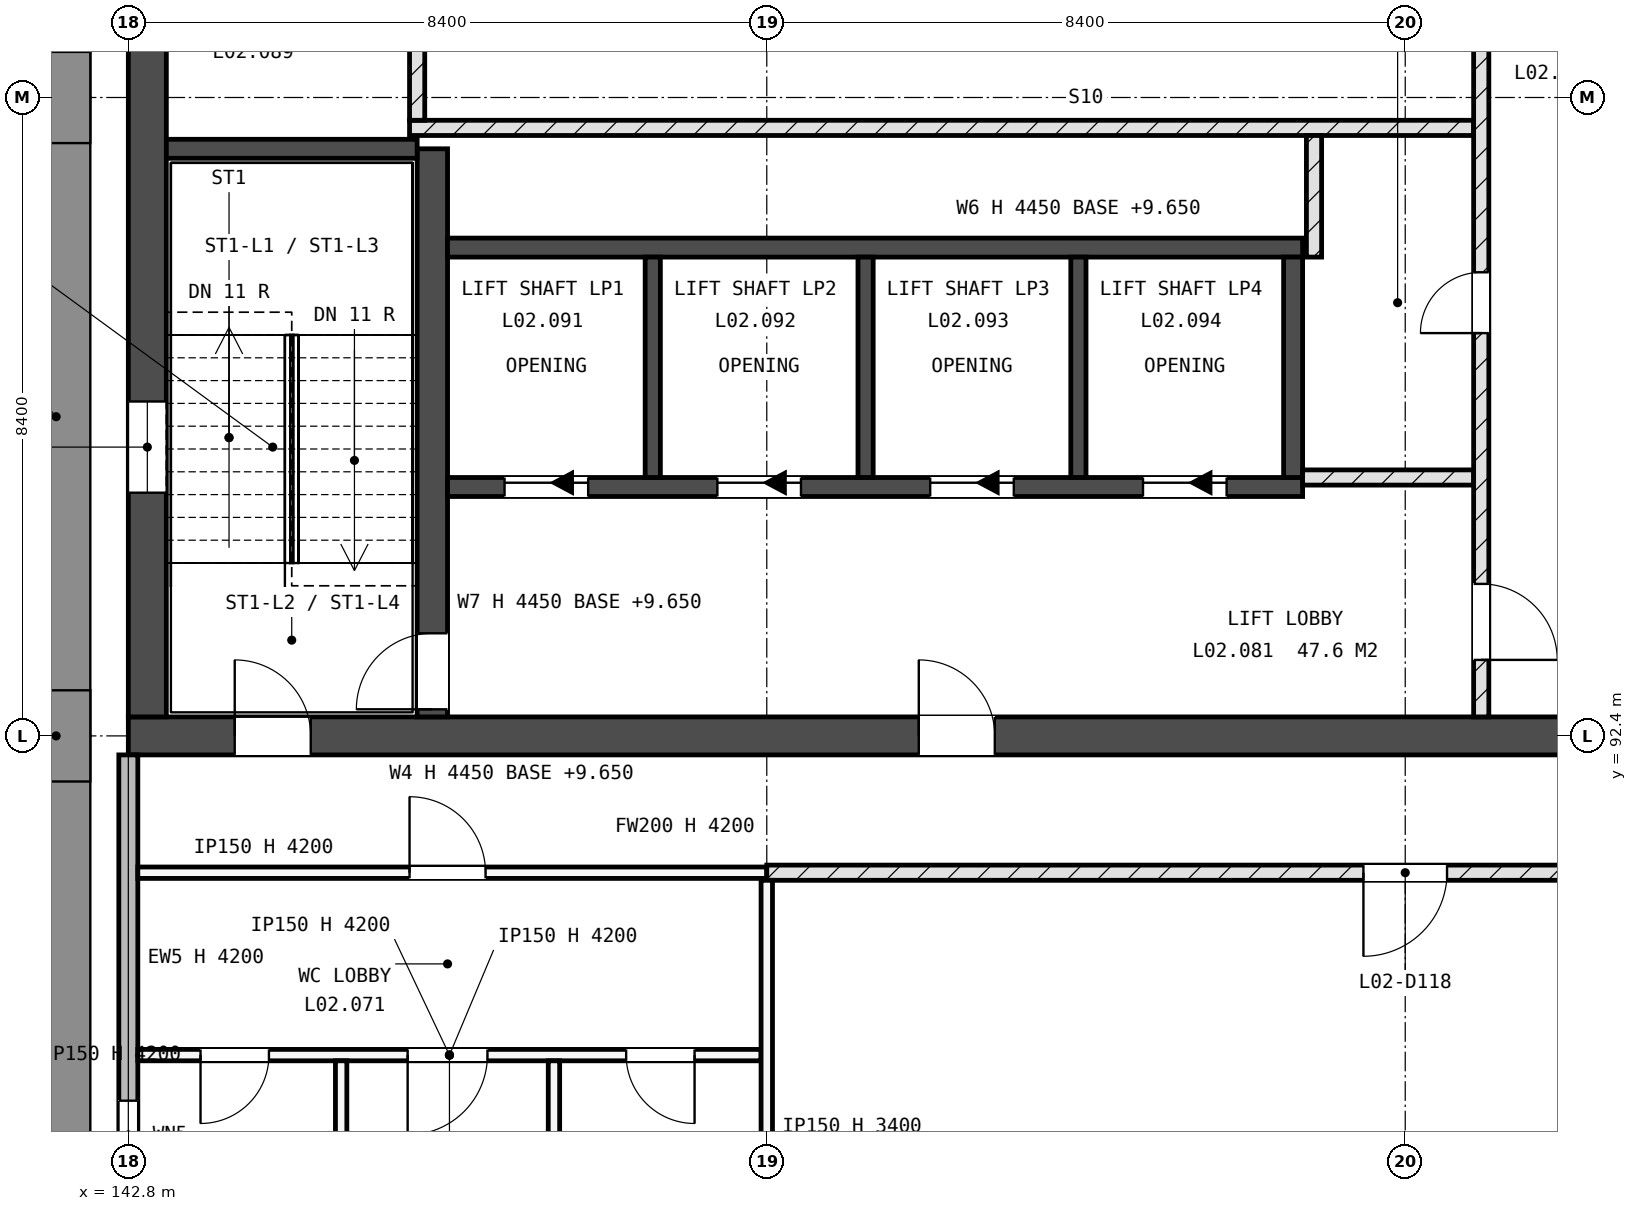
"""IFC4 building model, lengths in metres.
Left out: names, types, materials, properties, quantities, classifications, styles, units other than length and angle.
Written with IfcOpenShell. Run it as: python <this file> out.ifc"""

import sys

from ifc_helpers import new_model, si_unit, direction, frame, frame_2d, origin, place, context, subcontext, project, spatial, rectangle, extrude, element, fill, save


model = new_model("IFC4")
c1 = context("Model", 3, precision=1e-05, world=origin(), true_north=direction((0.0, 1.0)))
c2 = subcontext(c1, "Body", "Model", "MODEL_VIEW")
j1 = project(units=[si_unit("LENGTHUNIT", "METRE"), si_unit("PLANEANGLEUNIT", "RADIAN")], contexts=[c1])
p1 = place(None, origin())
s1 = spatial("IfcSite", under=j1, at=p1, CompositionType="ELEMENT")
p2 = place(p1, origin())
s2 = spatial("IfcBuilding", under=s1, at=p2, CompositionType="ELEMENT")
p3 = place(p2, frame((0.0, 0.0, 9.9)))
s3 = spatial("IfcBuildingStorey", under=s2, at=p3, CompositionType="ELEMENT", Elevation=9.9)
p4 = place(p3, frame((142.8, 92.4, -0.25), z_axis=(0.0, 0.0, 1.0), x_axis=(1.0, 0.0, 0.0)))
e1 = element("IfcWall", 1, at=p4, inside=s3, PredefinedType="SHEAR", context=c2, shape_type="SweptSolid", body=[
    extrude(rectangle(XDim=25.2, YDim=0.5, at=frame_2d((12.6, 0.0))), origin(), (0.0, 0.0, 1.0), 4.45),
])
p5 = place(p4, frame((1.4, 0.0, 0.25)))
e2 = element("IfcOpeningElement", 2, at=p5, cuts=e1, PredefinedType="OPENING", context=c2, shape_type="SweptSolid", body=[
    extrude(rectangle(XDim=1.0, YDim=2.1, at=frame_2d((0.5, 1.05))), frame((0.0, 0.26, 0.0), z_axis=(0.0, -1.0, 0.0), x_axis=(1.0, 0.0, 0.0)), (0.0, 0.0, 1.0), 0.52),
])
p6 = place(p4, frame((19.1, 0.0, 0.25)))
e3 = element("IfcOpeningElement", 3, at=p6, cuts=e1, PredefinedType="OPENING", context=c2, shape_type="SweptSolid", body=[
    extrude(rectangle(XDim=1.0, YDim=2.1, at=frame_2d((0.5, 1.05))), frame((0.0, 0.26, 0.0), z_axis=(0.0, -1.0, 0.0), x_axis=(1.0, 0.0, 0.0)), (0.0, 0.0, 1.0), 0.52),
])
p7 = place(p4, frame((10.4, 0.0, 0.25)))
e4 = element("IfcOpeningElement", 4, at=p7, cuts=e1, PredefinedType="OPENING", context=c2, shape_type="SweptSolid", body=[
    extrude(rectangle(XDim=1.0, YDim=2.1, at=frame_2d((0.5, 1.05))), frame((0.0, 0.26, 0.0), z_axis=(0.0, -1.0, 0.0), x_axis=(1.0, 0.0, 0.0)), (0.0, 0.0, 1.0), 0.52),
])
p8 = place(p3, frame((143.05, 92.65, -0.25), z_axis=(0.0, 0.0, 1.0), x_axis=(0.0, 1.0, 0.0)))
e5 = element("IfcWall", 5, at=p8, inside=s3, PredefinedType="SHEAR", context=c2, shape_type="SweptSolid", body=[
    extrude(rectangle(XDim=16.3, YDim=0.5, at=frame_2d((8.15, 0.0))), origin(), (0.0, 0.0, 1.0), 4.45),
])
p9 = place(p8, frame((2.95, 0.0, 1.85)))
e6 = element("IfcOpeningElement", 6, at=p9, cuts=e5, PredefinedType="OPENING", context=c2, shape_type="SweptSolid", body=[
    extrude(rectangle(XDim=1.2, YDim=0.9, at=frame_2d((0.6, 0.45))), frame((0.0, 0.26, 0.0), z_axis=(0.0, -1.0, 0.0), x_axis=(1.0, 0.0, 0.0)), (0.0, 0.0, 1.0), 0.52),
])
p10 = place(p3, frame((146.8, 92.65, -0.25), z_axis=(0.0, 0.0, 1.0), x_axis=(0.0, 1.0, 0.0)))
e7 = element("IfcWall", 7, at=p10, inside=s3, PredefinedType="SHEAR", context=c2, shape_type="SweptSolid", body=[
    extrude(rectangle(XDim=7.475, YDim=0.4, at=frame_2d((3.738, 0.0))), origin(), (0.0, 0.0, 1.0), 4.45),
])
p11 = place(p10, frame((0.1, 0.0, 0.25)))
e8 = element("IfcOpeningElement", 8, at=p11, cuts=e7, PredefinedType="OPENING", context=c2, shape_type="SweptSolid", body=[
    extrude(rectangle(XDim=1.0, YDim=2.1, at=frame_2d((0.5, 1.05))), frame((0.0, 0.21, 0.0), z_axis=(0.0, -1.0, 0.0), x_axis=(1.0, 0.0, 0.0)), (0.0, 0.0, 1.0), 0.42),
])
p12 = place(p3, frame((143.3, 100.125, -0.25), z_axis=(0.0, 0.0, 1.0), x_axis=(1.0, 0.0, 0.0)))
e9 = element("IfcWall", 9, at=p12, inside=s3, PredefinedType="SHEAR", context=c2, shape_type="SweptSolid", body=[
    extrude(rectangle(XDim=3.3, YDim=0.25, at=frame_2d((1.65, 0.0))), origin(), (0.0, 0.0, 1.0), 4.45),
])
p13 = place(p3, frame((147.0, 95.675, -0.25), z_axis=(0.0, 0.0, 1.0), x_axis=(1.0, 0.0, 0.0)))
e10 = element("IfcWall", 10, at=p13, inside=s3, PredefinedType="SHEAR", context=c2, shape_type="SweptSolid", body=[
    extrude(rectangle(XDim=11.25, YDim=0.25, at=frame_2d((5.625, 0.0))), origin(), (0.0, 0.0, 1.0), 4.45),
])
p14 = place(p13, frame((0.75, 0.0, 0.25)))
e11 = element("IfcOpeningElement", 11, at=p14, cuts=e10, PredefinedType="OPENING", context=c2, shape_type="SweptSolid", body=[
    extrude(rectangle(XDim=1.1, YDim=2.1, at=frame_2d((0.55, 1.05))), frame((0.0, 0.135, 0.0), z_axis=(0.0, -1.0, 0.0), x_axis=(1.0, 0.0, 0.0)), (0.0, 0.0, 1.0), 0.27),
])
p15 = place(p13, frame((3.55, 0.0, 0.25)))
e12 = element("IfcOpeningElement", 12, at=p15, cuts=e10, PredefinedType="OPENING", context=c2, shape_type="SweptSolid", body=[
    extrude(rectangle(XDim=1.1, YDim=2.1, at=frame_2d((0.55, 1.05))), frame((0.0, 0.135, 0.0), z_axis=(0.0, -1.0, 0.0), x_axis=(1.0, 0.0, 0.0)), (0.0, 0.0, 1.0), 0.27),
])
p16 = place(p13, frame((6.35, 0.0, 0.25)))
e13 = element("IfcOpeningElement", 13, at=p16, cuts=e10, PredefinedType="OPENING", context=c2, shape_type="SweptSolid", body=[
    extrude(rectangle(XDim=1.1, YDim=2.1, at=frame_2d((0.55, 1.05))), frame((0.0, 0.135, 0.0), z_axis=(0.0, -1.0, 0.0), x_axis=(1.0, 0.0, 0.0)), (0.0, 0.0, 1.0), 0.27),
])
p17 = place(p13, frame((9.15, 0.0, 0.25)))
e14 = element("IfcOpeningElement", 14, at=p17, cuts=e10, PredefinedType="OPENING", context=c2, shape_type="SweptSolid", body=[
    extrude(rectangle(XDim=1.1, YDim=2.1, at=frame_2d((0.55, 1.05))), frame((0.0, 0.135, 0.0), z_axis=(0.0, -1.0, 0.0), x_axis=(1.0, 0.0, 0.0)), (0.0, 0.0, 1.0), 0.27),
])
p18 = place(p3, frame((147.0, 98.825, -0.25), z_axis=(0.0, 0.0, 1.0), x_axis=(1.0, 0.0, 0.0)))
e15 = element("IfcWall", 15, at=p18, inside=s3, PredefinedType="SHEAR", context=c2, shape_type="SweptSolid", body=[
    extrude(rectangle(XDim=11.25, YDim=0.25, at=frame_2d((5.625, 0.0))), origin(), (0.0, 0.0, 1.0), 4.45),
])
p19 = place(p3, frame((158.125, 95.8, -0.25), z_axis=(0.0, 0.0, 1.0), x_axis=(0.0, 1.0, 0.0)))
e16 = element("IfcWall", 16, at=p19, inside=s3, PredefinedType="SHEAR", context=c2, shape_type="SweptSolid", body=[
    extrude(rectangle(XDim=2.9, YDim=0.25, at=frame_2d((1.45, 0.0))), origin(), (0.0, 0.0, 1.0), 4.45),
])
for number, where, z_axis, x_axis in (
    (17, (149.7, 95.8, -0.25), (0.0, 0.0, 1.0), (0.0, 1.0, 0.0)),
    (18, (152.5, 95.8, -0.25), (0.0, 0.0, 1.0), (0.0, 1.0, 0.0)),
    (19, (155.3, 95.8, -0.25), (0.0, 0.0, 1.0), (0.0, 1.0, 0.0)),
):
    element("IfcWall", number, at=place(p3, frame(where, z_axis=z_axis, x_axis=x_axis)), inside=s3, PredefinedType="SHEAR", context=c2, shape_type="SweptSolid", body=[
        extrude(rectangle(XDim=2.9, YDim=0.2, at=frame_2d((1.45, 0.0))), origin(), (0.0, 0.0, 1.0), 4.45),
    ])
p20 = place(p3, frame((142.8, 84.5, 0.0), z_axis=(0.0, 0.0, 1.0), x_axis=(0.0, 1.0, 0.0)))
e20 = element("IfcWall", 20, at=p20, inside=s3, PredefinedType="STANDARD", context=c2, shape_type="SweptSolid", body=[
    extrude(rectangle(XDim=7.65, YDim=0.25, at=frame_2d((3.825, 0.0))), origin(), (0.0, 0.0, 1.0), 4.2),
])
p21 = place(p20, frame((2.2, 0.0, 2.1)))
e21 = element("IfcOpeningElement", 21, at=p21, cuts=e20, PredefinedType="OPENING", context=c2, shape_type="SweptSolid", body=[
    extrude(rectangle(XDim=0.9, YDim=0.6, at=frame_2d((0.45, 0.3))), frame((0.0, 0.135, 0.0), z_axis=(0.0, -1.0, 0.0), x_axis=(1.0, 0.0, 0.0)), (0.0, 0.0, 1.0), 0.27),
])
p22 = place(p3, frame((142.925, 88.2, 0.0), z_axis=(0.0, 0.0, 1.0), x_axis=(1.0, 0.0, 0.0)))
e22 = element("IfcWall", 22, at=p22, inside=s3, PredefinedType="PARTITIONING", context=c2, shape_type="SweptSolid", body=[
    extrude(rectangle(XDim=8.2, YDim=0.15, at=frame_2d((4.1, 0.0))), origin(), (0.0, 0.0, 1.0), 4.2),
])
p23 = place(p22, frame((0.825, 0.0, 0.0)))
e23 = element("IfcOpeningElement", 23, at=p23, cuts=e22, PredefinedType="OPENING", context=c2, shape_type="SweptSolid", body=[
    extrude(rectangle(XDim=0.9, YDim=2.1, at=frame_2d((0.45, 1.05))), frame((0.0, 0.085, 0.0), z_axis=(0.0, -1.0, 0.0), x_axis=(1.0, 0.0, 0.0)), (0.0, 0.0, 1.0), 0.17),
])
p24 = place(p22, frame((3.55, 0.0, 0.0)))
e24 = element("IfcOpeningElement", 24, at=p24, cuts=e22, PredefinedType="OPENING", context=c2, shape_type="SweptSolid", body=[
    extrude(rectangle(XDim=1.05, YDim=2.25, at=frame_2d((0.525, 1.125))), frame((0.0, 0.085, 0.0), z_axis=(0.0, -1.0, 0.0), x_axis=(1.0, 0.0, 0.0)), (0.0, 0.0, 1.0), 0.17),
])
p25 = place(p22, frame((6.425, 0.0, 0.0)))
e25 = element("IfcOpeningElement", 25, at=p25, cuts=e22, PredefinedType="OPENING", context=c2, shape_type="SweptSolid", body=[
    extrude(rectangle(XDim=0.9, YDim=2.1, at=frame_2d((0.45, 1.05))), frame((0.0, 0.085, 0.0), z_axis=(0.0, -1.0, 0.0), x_axis=(1.0, 0.0, 0.0)), (0.0, 0.0, 1.0), 0.17),
])
p26 = place(p3, frame((142.925, 90.6, 0.0), z_axis=(0.0, 0.0, 1.0), x_axis=(1.0, 0.0, 0.0)))
e26 = element("IfcWall", 26, at=p26, inside=s3, PredefinedType="PARTITIONING", context=c2, shape_type="SweptSolid", body=[
    extrude(rectangle(XDim=8.275, YDim=0.15, at=frame_2d((4.137, 0.0))), origin(), (0.0, 0.0, 1.0), 4.2),
])
p27 = place(p26, frame((3.575, 0.0, 0.0)))
e27 = element("IfcOpeningElement", 27, at=p27, cuts=e26, PredefinedType="OPENING", context=c2, shape_type="SweptSolid", body=[
    extrude(rectangle(XDim=1.0, YDim=2.1, at=frame_2d((0.5, 1.05))), frame((0.0, 0.085, 0.0), z_axis=(0.0, -1.0, 0.0), x_axis=(1.0, 0.0, 0.0)), (0.0, 0.0, 1.0), 0.17),
])
p28 = place(p3, frame((151.2, 90.6, 0.0), z_axis=(0.0, 0.0, 1.0), x_axis=(1.0, 0.0, 0.0)))
e28 = element("IfcWall", 28, at=p28, inside=s3, PredefinedType="SOLIDWALL", context=c2, shape_type="SweptSolid", body=[
    extrude(rectangle(XDim=16.8, YDim=0.2, at=frame_2d((8.4, 0.0))), origin(), (0.0, 0.0, 1.0), 4.2),
])
p29 = place(p28, frame((7.85, 0.0, 0.0)))
e29 = element("IfcOpeningElement", 29, at=p29, cuts=e28, PredefinedType="OPENING", context=c2, shape_type="SweptSolid", body=[
    extrude(rectangle(XDim=1.1, YDim=2.25, at=frame_2d((0.55, 1.125))), frame((0.0, 0.11, 0.0), z_axis=(0.0, -1.0, 0.0), x_axis=(1.0, 0.0, 0.0)), (0.0, 0.0, 1.0), 0.22),
])
p30 = place(p3, frame((158.25, 95.8, 0.0), z_axis=(0.0, 0.0, 1.0), x_axis=(1.0, 0.0, 0.0)))
e30 = element("IfcWall", 30, at=p30, inside=s3, PredefinedType="SOLIDWALL", context=c2, shape_type="SweptSolid", body=[
    extrude(rectangle(XDim=2.25, YDim=0.2, at=frame_2d((1.125, 0.0))), origin(), (0.0, 0.0, 1.0), 4.2),
])
p31 = place(p3, frame((146.5, 100.4, 0.0), z_axis=(0.0, 0.0, 1.0), x_axis=(1.0, 0.0, 0.0)))
e31 = element("IfcWall", 31, at=p31, inside=s3, PredefinedType="SOLIDWALL", context=c2, shape_type="SweptSolid", body=[
    extrude(rectangle(XDim=14.0, YDim=0.2, at=frame_2d((7.0, 0.0))), origin(), (0.0, 0.0, 1.0), 4.2),
])
p32 = place(p3, frame((145.6, 84.125, 0.0), z_axis=(0.0, 0.0, 1.0), x_axis=(0.0, 1.0, 0.0)))
e32 = element("IfcWall", 32, at=p32, inside=s3, PredefinedType="PARTITIONING", context=c2, shape_type="SweptSolid", body=[
    extrude(rectangle(XDim=4.0, YDim=0.15, at=frame_2d((2.0, 0.0))), origin(), (0.0, 0.0, 1.0), 4.2),
])
p33 = place(p3, frame((146.6, 100.5, 0.0), z_axis=(0.0, 0.0, 1.0), x_axis=(0.0, 1.0, 0.0)))
e33 = element("IfcWall", 33, at=p33, inside=s3, PredefinedType="SOLIDWALL", context=c2, shape_type="SweptSolid", body=[
    extrude(rectangle(XDim=5.3, YDim=0.2, at=frame_2d((2.65, 0.0))), origin(), (0.0, 0.0, 1.0), 4.2),
])
p34 = place(p33, frame((1.8, 0.0, 0.0)))
e34 = element("IfcOpeningElement", 34, at=p34, cuts=e33, PredefinedType="OPENING", context=c2, shape_type="SweptSolid", body=[
    extrude(rectangle(XDim=1.0, YDim=2.1, at=frame_2d((0.5, 1.05))), frame((0.0, 0.11, 0.0), z_axis=(0.0, -1.0, 0.0), x_axis=(1.0, 0.0, 0.0)), (0.0, 0.0, 1.0), 0.22),
])
p35 = place(p3, frame((148.4, 84.125, 0.0), z_axis=(0.0, 0.0, 1.0), x_axis=(0.0, 1.0, 0.0)))
e35 = element("IfcWall", 35, at=p35, inside=s3, PredefinedType="PARTITIONING", context=c2, shape_type="SweptSolid", body=[
    extrude(rectangle(XDim=4.0, YDim=0.15, at=frame_2d((2.0, 0.0))), origin(), (0.0, 0.0, 1.0), 4.2),
])
p36 = place(p3, frame((151.2, 84.0, 0.0), z_axis=(0.0, 0.0, 1.0), x_axis=(0.0, 1.0, 0.0)))
e36 = element("IfcWall", 36, at=p36, inside=s3, PredefinedType="PARTITIONING", context=c2, shape_type="SweptSolid", body=[
    extrude(rectangle(XDim=6.5, YDim=0.15, at=frame_2d((3.25, 0.0))), origin(), (0.0, 0.0, 1.0), 3.4),
])
p37 = place(p3, frame((158.4, 98.7, 0.0), z_axis=(0.0, 0.0, 1.0), x_axis=(0.0, 1.0, 0.0)))
e37 = element("IfcWall", 37, at=p37, inside=s3, PredefinedType="SOLIDWALL", context=c2, shape_type="SweptSolid", body=[
    extrude(rectangle(XDim=1.6, YDim=0.2, at=frame_2d((0.8, 0.0))), origin(), (0.0, 0.0, 1.0), 4.2),
])
p38 = place(p3, frame((160.6, 92.65, 0.0), z_axis=(0.0, 0.0, 1.0), x_axis=(0.0, 1.0, 0.0)))
e38 = element("IfcWall", 38, at=p38, inside=s3, PredefinedType="SOLIDWALL", context=c2, shape_type="SweptSolid", body=[
    extrude(rectangle(XDim=12.45, YDim=0.2, at=frame_2d((6.225, 0.0))), origin(), (0.0, 0.0, 1.0), 4.2),
])
p39 = place(p38, frame((5.05, 0.0, 0.0)))
e39 = element("IfcOpeningElement", 39, at=p39, cuts=e38, PredefinedType="OPENING", context=c2, shape_type="SweptSolid", body=[
    extrude(rectangle(XDim=0.8, YDim=2.1, at=frame_2d((0.4, 1.05))), frame((0.0, 0.11, 0.0), z_axis=(0.0, -1.0, 0.0), x_axis=(1.0, 0.0, 0.0)), (0.0, 0.0, 1.0), 0.22),
])
p40 = place(p38, frame((0.75, 0.0, 0.0)))
e40 = element("IfcOpeningElement", 40, at=p40, cuts=e38, PredefinedType="OPENING", context=c2, shape_type="SweptSolid", body=[
    extrude(rectangle(XDim=1.0, YDim=2.1, at=frame_2d((0.5, 1.05))), frame((0.0, 0.11, 0.0), z_axis=(0.0, -1.0, 0.0), x_axis=(1.0, 0.0, 0.0)), (0.0, 0.0, 1.0), 0.22),
])
p41 = place(p21, origin())
e41 = element("IfcWindow", 41, at=p41, inside=s3, PartitioningType="SINGLE_PANEL", PredefinedType="WINDOW", context=c2, shape_type="SweptSolid", body=[
    extrude(rectangle(XDim=0.9, YDim=0.6, at=frame_2d((0.45, 0.3))), frame((0.0, 0.03, 0.0), z_axis=(0.0, -1.0, 0.0), x_axis=(1.0, 0.0, 0.0)), (0.0, 0.0, 1.0), 0.06),
])
fill(e21, e41)
p42 = place(p9, origin())
e42 = element("IfcWindow", 42, at=p42, inside=s3, PartitioningType="SINGLE_PANEL", PredefinedType="WINDOW", context=c2, shape_type="SweptSolid", body=[
    extrude(rectangle(XDim=1.2, YDim=0.9, at=frame_2d((0.6, 0.45))), frame((0.0, 0.03, 0.0), z_axis=(0.0, -1.0, 0.0), x_axis=(1.0, 0.0, 0.0)), (0.0, 0.0, 1.0), 0.06),
])
fill(e6, e42)
p43 = place(p14, origin())
e43 = element("IfcDoor", 43, at=p43, inside=s3, OperationType="SLIDING_TO_LEFT", PredefinedType="DOOR", context=c2, shape_type="SweptSolid", body=[
    extrude(rectangle(XDim=1.1, YDim=2.1, at=frame_2d((0.55, 1.05))), frame((0.0, 0.025, 0.0), z_axis=(0.0, -1.0, 0.0), x_axis=(1.0, 0.0, 0.0)), (0.0, 0.0, 1.0), 0.05),
])
fill(e11, e43)
p44 = place(p15, origin())
e44 = element("IfcDoor", 44, at=p44, inside=s3, OperationType="SLIDING_TO_LEFT", PredefinedType="DOOR", context=c2, shape_type="SweptSolid", body=[
    extrude(rectangle(XDim=1.1, YDim=2.1, at=frame_2d((0.55, 1.05))), frame((0.0, 0.025, 0.0), z_axis=(0.0, -1.0, 0.0), x_axis=(1.0, 0.0, 0.0)), (0.0, 0.0, 1.0), 0.05),
])
fill(e12, e44)
p45 = place(p16, origin())
e45 = element("IfcDoor", 45, at=p45, inside=s3, OperationType="SLIDING_TO_LEFT", PredefinedType="DOOR", context=c2, shape_type="SweptSolid", body=[
    extrude(rectangle(XDim=1.1, YDim=2.1, at=frame_2d((0.55, 1.05))), frame((0.0, 0.025, 0.0), z_axis=(0.0, -1.0, 0.0), x_axis=(1.0, 0.0, 0.0)), (0.0, 0.0, 1.0), 0.05),
])
fill(e13, e45)
p46 = place(p17, origin())
e46 = element("IfcDoor", 46, at=p46, inside=s3, OperationType="SLIDING_TO_LEFT", PredefinedType="DOOR", context=c2, shape_type="SweptSolid", body=[
    extrude(rectangle(XDim=1.1, YDim=2.1, at=frame_2d((0.55, 1.05))), frame((0.0, 0.025, 0.0), z_axis=(0.0, -1.0, 0.0), x_axis=(1.0, 0.0, 0.0)), (0.0, 0.0, 1.0), 0.05),
])
fill(e14, e46)
p47 = place(p5, origin())
e47 = element("IfcDoor", 47, at=p47, inside=s3, OperationType="SINGLE_SWING_RIGHT", PredefinedType="DOOR", context=c2, shape_type="SweptSolid", body=[
    extrude(rectangle(XDim=1.0, YDim=2.1, at=frame_2d((0.5, 1.05))), frame((0.0, 0.025, 0.0), z_axis=(0.0, -1.0, 0.0), x_axis=(1.0, 0.0, 0.0)), (0.0, 0.0, 1.0), 0.05),
])
fill(e2, e47)
p48 = place(p11, origin())
e48 = element("IfcDoor", 48, at=p48, inside=s3, OperationType="SINGLE_SWING_RIGHT", PredefinedType="DOOR", context=c2, shape_type="SweptSolid", body=[
    extrude(rectangle(XDim=1.0, YDim=2.1, at=frame_2d((0.5, 1.05))), frame((0.0, 0.025, 0.0), z_axis=(0.0, -1.0, 0.0), x_axis=(1.0, 0.0, 0.0)), (0.0, 0.0, 1.0), 0.05),
])
fill(e8, e48)
p49 = place(p23, origin())
e49 = element("IfcDoor", 49, at=p49, inside=s3, OperationType="SINGLE_SWING_LEFT", PredefinedType="DOOR", context=c2, shape_type="SweptSolid", body=[
    extrude(rectangle(XDim=0.9, YDim=2.1, at=frame_2d((0.45, 1.05))), frame((0.0, 0.025, 0.0), z_axis=(0.0, -1.0, 0.0), x_axis=(1.0, 0.0, 0.0)), (0.0, 0.0, 1.0), 0.05),
])
fill(e23, e49)
p50 = place(p24, origin())
e50 = element("IfcDoor", 50, at=p50, inside=s3, OperationType="SINGLE_SWING_LEFT", PredefinedType="DOOR", context=c2, shape_type="SweptSolid", body=[
    extrude(rectangle(XDim=1.05, YDim=2.25, at=frame_2d((0.525, 1.125))), frame((0.0, 0.025, 0.0), z_axis=(0.0, -1.0, 0.0), x_axis=(1.0, 0.0, 0.0)), (0.0, 0.0, 1.0), 0.05),
])
fill(e24, e50)
p51 = place(p25, origin())
e51 = element("IfcDoor", 51, at=p51, inside=s3, OperationType="SINGLE_SWING_RIGHT", PredefinedType="DOOR", context=c2, shape_type="SweptSolid", body=[
    extrude(rectangle(XDim=0.9, YDim=2.1, at=frame_2d((0.45, 1.05))), frame((0.0, 0.025, 0.0), z_axis=(0.0, -1.0, 0.0), x_axis=(1.0, 0.0, 0.0)), (0.0, 0.0, 1.0), 0.05),
])
fill(e25, e51)
p52 = place(p29, origin())
e52 = element("IfcDoor", 52, at=p52, inside=s3, OperationType="SINGLE_SWING_LEFT", PredefinedType="DOOR", context=c2, shape_type="SweptSolid", body=[
    extrude(rectangle(XDim=1.1, YDim=2.25, at=frame_2d((0.55, 1.125))), frame((0.0, 0.025, 0.0), z_axis=(0.0, -1.0, 0.0), x_axis=(1.0, 0.0, 0.0)), (0.0, 0.0, 1.0), 0.05),
])
fill(e29, e52)
p53 = place(p39, origin())
e53 = element("IfcDoor", 53, at=p53, inside=s3, OperationType="SINGLE_SWING_RIGHT", PredefinedType="DOOR", context=c2, shape_type="SweptSolid", body=[
    extrude(rectangle(XDim=0.8, YDim=2.1, at=frame_2d((0.4, 1.05))), frame((0.0, 0.025, 0.0), z_axis=(0.0, -1.0, 0.0), x_axis=(1.0, 0.0, 0.0)), (0.0, 0.0, 1.0), 0.05),
])
fill(e39, e53)
p54 = place(p27, origin())
e54 = element("IfcDoor", 54, at=p54, inside=s3, OperationType="SINGLE_SWING_RIGHT", PredefinedType="DOOR", context=c2, shape_type="SweptSolid", body=[
    extrude(rectangle(XDim=1.0, YDim=2.1, at=frame_2d((0.5, 1.05))), frame((0.0, 0.025, 0.0), z_axis=(0.0, -1.0, 0.0), x_axis=(1.0, 0.0, 0.0)), (0.0, 0.0, 1.0), 0.05),
])
fill(e27, e54)
p55 = place(p7, origin())
e55 = element("IfcDoor", 55, at=p55, inside=s3, OperationType="SINGLE_SWING_RIGHT", PredefinedType="DOOR", context=c2, shape_type="SweptSolid", body=[
    extrude(rectangle(XDim=1.0, YDim=2.1, at=frame_2d((0.5, 1.05))), frame((0.0, 0.025, 0.0), z_axis=(0.0, -1.0, 0.0), x_axis=(1.0, 0.0, 0.0)), (0.0, 0.0, 1.0), 0.05),
])
fill(e4, e55)
p56 = place(p40, origin())
e56 = element("IfcDoor", 56, at=p56, inside=s3, OperationType="SINGLE_SWING_LEFT", PredefinedType="DOOR", context=c2, shape_type="SweptSolid", body=[
    extrude(rectangle(XDim=1.0, YDim=2.1, at=frame_2d((0.5, 1.05))), frame((0.0, 0.025, 0.0), z_axis=(0.0, -1.0, 0.0), x_axis=(1.0, 0.0, 0.0)), (0.0, 0.0, 1.0), 0.05),
])
fill(e40, e56)
save(model, sys.argv[1])
